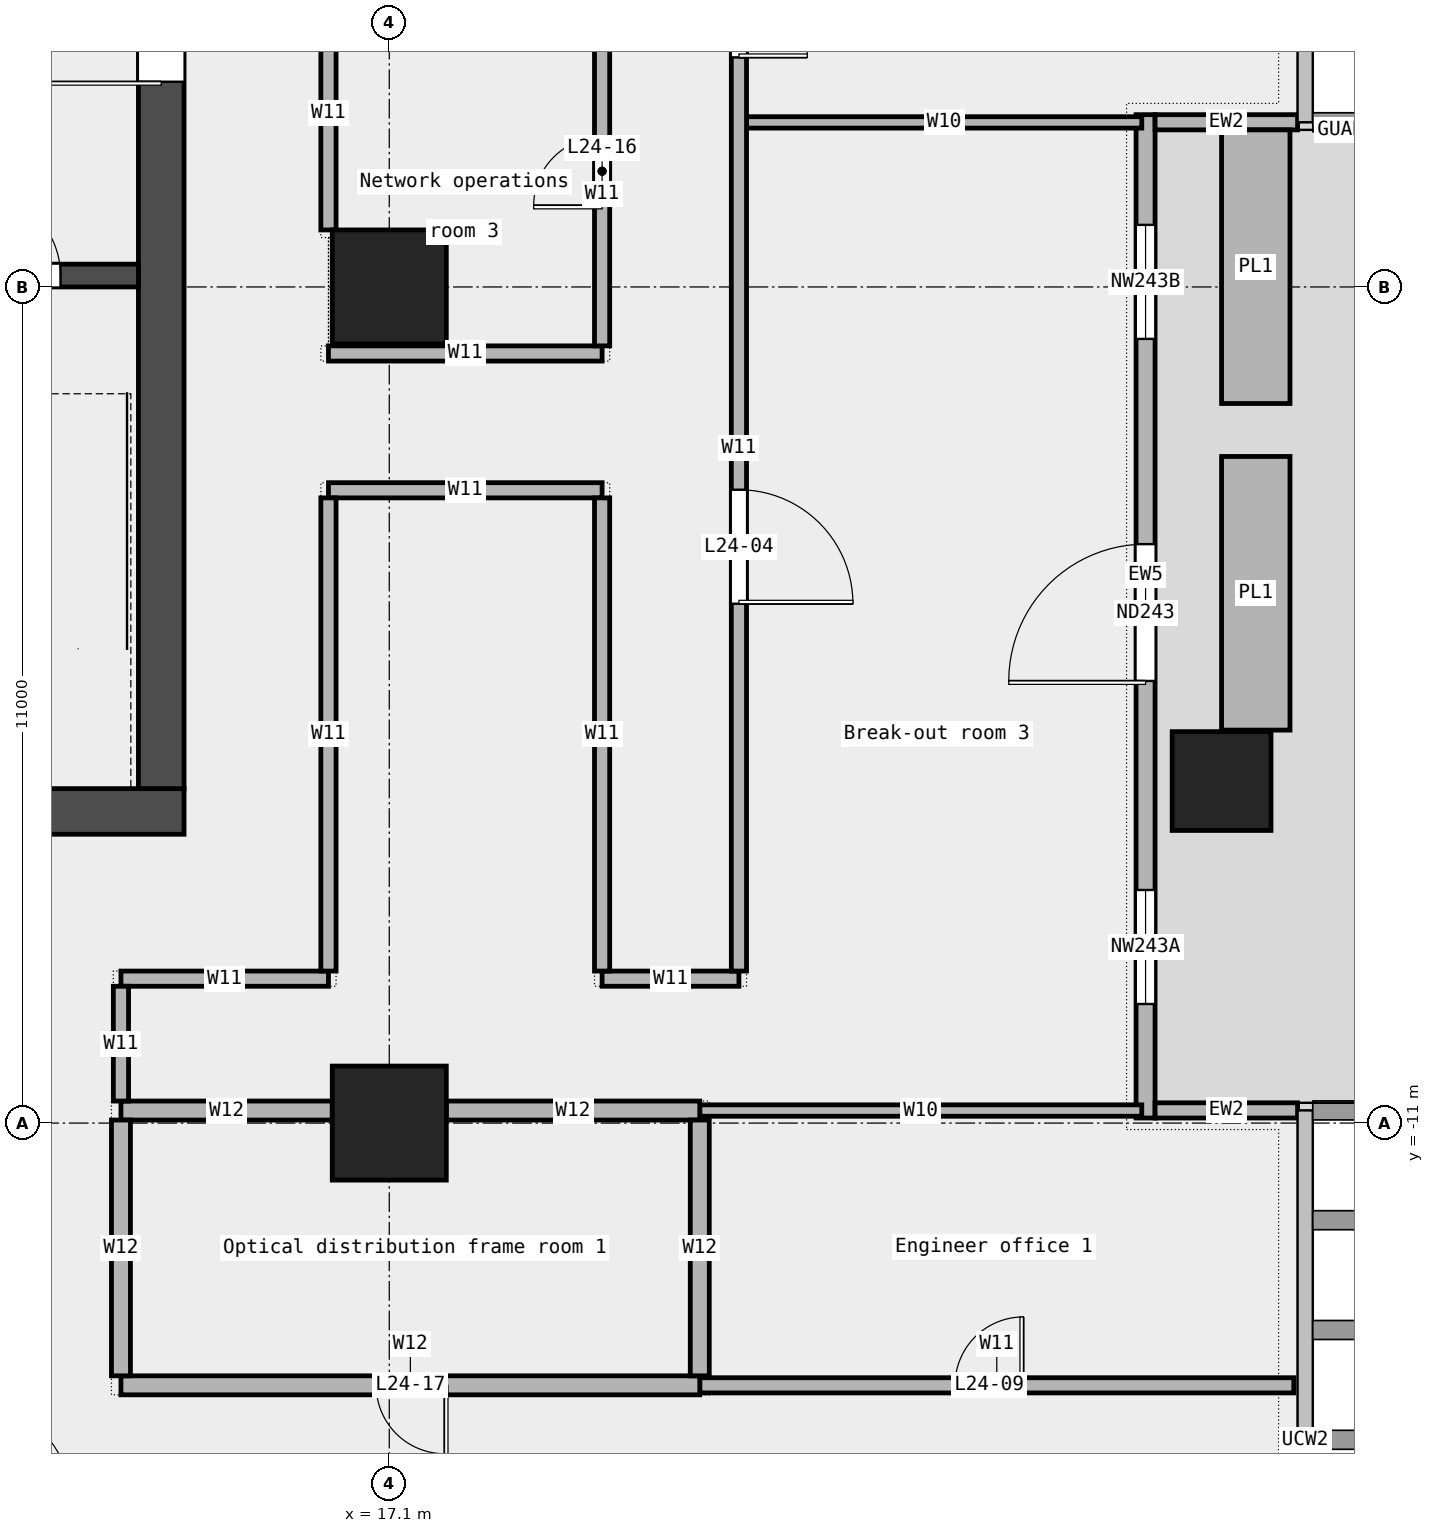
"""IFC4 building model, lengths in metres.
Left out: names, types, materials, properties, quantities, classifications, styles, units other than length and angle.
Written with IfcOpenShell. Run it as: python <this file> out.ifc"""

import sys

from ifc_helpers import new_model, si_unit, direction, frame, frame_2d, origin, origin_2d, place, context, subcontext, project, spatial, rectangle, extrude, element, fill, save


model = new_model("IFC4")
c1 = context("Model", 3, precision=1e-05, world=origin(), true_north=direction((0.0, 1.0)))
c2 = subcontext(c1, "Body", "Model", "MODEL_VIEW")
j1 = project(units=[si_unit("LENGTHUNIT", "METRE"), si_unit("PLANEANGLEUNIT", "RADIAN")], contexts=[c1])
p1 = place(None, origin())
s1 = spatial("IfcSite", under=j1, at=p1, CompositionType="ELEMENT")
p2 = place(p1, origin())
s2 = spatial("IfcBuilding", under=s1, at=p2, CompositionType="ELEMENT")
p3 = place(p2, frame((0.0, 0.0, 121.6)))
s3 = spatial("IfcBuildingStorey", under=s2, at=p3, CompositionType="ELEMENT", Elevation=121.6)
p4 = place(p3, frame((28.05, -6.5, 0.0), z_axis=(0.0, 0.0, 1.0), x_axis=(1.0, 0.0, 0.0)))
e1 = element("IfcColumn", 1, at=p4, inside=s3, PredefinedType="COLUMN", context=c2, shape_type="SweptSolid", body=[
    extrude(rectangle(XDim=1.3, YDim=1.3, at=origin_2d()), origin(), (0.0, 0.0, 1.0), 4.05),
])
for number, where, z_axis, x_axis in (
    (2, (17.1, -11.0, 0.0), (0.0, 0.0, 1.0), (1.0, 0.0, 0.0)),
    (3, (17.1, 0.0, 0.0), (0.0, 0.0, 1.0), (1.0, 0.0, 0.0)),
):
    element("IfcColumn", number, at=place(p3, frame(where, z_axis=z_axis, x_axis=x_axis)), inside=s3, PredefinedType="COLUMN", context=c2, shape_type="SweptSolid", body=[
        extrude(rectangle(XDim=1.5, YDim=1.5, at=origin_2d()), origin(), (0.0, 0.0, 1.0), 4.05),
    ])
p5 = place(p3, frame((27.05, -10.933, 0.0), z_axis=(0.0, 0.0, 1.0), x_axis=(0.0, 1.0, 0.0)))
e4 = element("IfcWall", 4, at=p5, inside=s3, PredefinedType="STANDARD", context=c2, shape_type="SweptSolid", body=[
    extrude(rectangle(XDim=13.2, YDim=0.25, at=frame_2d((6.6, 0.0))), origin(), (0.0, 0.0, 1.0), 4.05),
])
p6 = place(p5, frame((1.5, 0.0, 0.45)))
e5 = element("IfcOpeningElement", 5, at=p6, cuts=e4, PredefinedType="OPENING", context=c2, shape_type="SweptSolid", body=[
    extrude(rectangle(XDim=1.5, YDim=3.0, at=frame_2d((0.75, 1.5))), frame((0.0, 0.137, 0.0), z_axis=(0.0, -1.0, 0.0), x_axis=(1.0, 0.0, 0.0)), (0.0, 0.0, 1.0), 0.274),
])
p7 = place(p5, frame((5.75, 0.0, 0.0)))
e6 = element("IfcOpeningElement", 6, at=p7, cuts=e4, PredefinedType="OPENING", context=c2, shape_type="SweptSolid", body=[
    extrude(rectangle(XDim=1.8, YDim=2.4, at=frame_2d((0.9, 1.2))), frame((0.0, 0.137, 0.0), z_axis=(0.0, -1.0, 0.0), x_axis=(1.0, 0.0, 0.0)), (0.0, 0.0, 1.0), 0.274),
])
p8 = place(p5, frame((10.25, 0.0, 0.45)))
e7 = element("IfcOpeningElement", 7, at=p8, cuts=e4, PredefinedType="OPENING", context=c2, shape_type="SweptSolid", body=[
    extrude(rectangle(XDim=1.5, YDim=3.0, at=frame_2d((0.75, 1.5))), frame((0.0, 0.137, 0.0), z_axis=(0.0, -1.0, 0.0), x_axis=(1.0, 0.0, 0.0)), (0.0, 0.0, 1.0), 0.274),
])
for number, where, z_axis, x_axis in (
    (8, (29.05, -10.833, 0.0), (0.0, 0.0, 1.0), (-1.0, 0.0, 0.0)),
    (9, (29.05, 2.167, 0.0), (0.0, 0.0, 1.0), (-1.0, 0.0, 0.0)),
):
    element("IfcWall", number, at=place(p3, frame(where, z_axis=z_axis, x_axis=x_axis)), inside=s3, PredefinedType="STANDARD", context=c2, shape_type="SweptSolid", body=[
        extrude(rectangle(XDim=1.875, YDim=0.2, at=frame_2d((0.938, 0.0))), origin(), (0.0, 0.0, 1.0), 4.05),
    ])
for number, where, z_axis, x_axis in (
    (10, (28.5, -5.83, 0.0), (0.0, 0.0, 1.0), (0.0, 1.0, 0.0)),
    (11, (28.5, -1.533, 0.0), (0.0, 0.0, 1.0), (0.0, 1.0, 0.0)),
):
    element("IfcWall", number, at=place(p3, frame(where, z_axis=z_axis, x_axis=x_axis)), inside=s3, PredefinedType="STANDARD", context=c2, shape_type="SweptSolid", body=[
        extrude(rectangle(XDim=3.6, YDim=0.9, at=frame_2d((1.8, 0.0))), origin(), (0.0, 0.0, 1.0), 0.7),
    ])
p9 = place(p3, frame((21.185, -14.45, 0.0), z_axis=(0.0, 0.0, 1.0), x_axis=(1.0, 0.0, 0.0)))
e12 = element("IfcWall", 12, at=p9, inside=s3, PredefinedType="PARTITIONING", context=c2, shape_type="SweptSolid", body=[
    extrude(rectangle(XDim=7.815, YDim=0.2, at=frame_2d((3.907, 0.0))), origin(), (0.0, 0.0, 1.0), 4.05),
])
p10 = place(p9, frame((3.357, 0.0, 0.0)))
e13 = element("IfcOpeningElement", 13, at=p10, cuts=e12, PredefinedType="OPENING", context=c2, shape_type="SweptSolid", body=[
    extrude(rectangle(XDim=0.9, YDim=2.1, at=frame_2d((0.45, 1.05))), frame((0.0, 0.112, 0.0), z_axis=(0.0, -1.0, 0.0), x_axis=(1.0, 0.0, 0.0)), (0.0, 0.0, 1.0), 0.224),
])
p11 = place(p3, frame((13.57, -14.45, 0.0), z_axis=(0.0, 0.0, 1.0), x_axis=(1.0, 0.0, 0.0)))
e14 = element("IfcWall", 14, at=p11, inside=s3, PredefinedType="PARTITIONING", context=c2, shape_type="SweptSolid", body=[
    extrude(rectangle(XDim=7.615, YDim=0.25, at=frame_2d((3.808, 0.0))), origin(), (0.0, 0.0, 1.0), 4.05),
])
p12 = place(p11, frame((3.357, 0.0, 0.0)))
e15 = element("IfcOpeningElement", 15, at=p12, cuts=e14, PredefinedType="OPENING", context=c2, shape_type="SweptSolid", body=[
    extrude(rectangle(XDim=0.9, YDim=2.1, at=frame_2d((0.45, 1.05))), frame((0.0, 0.137, 0.0), z_axis=(0.0, -1.0, 0.0), x_axis=(1.0, 0.0, 0.0)), (0.0, 0.0, 1.0), 0.274),
])
p13 = place(p3, frame((21.185, -10.835, 0.0), z_axis=(0.0, 0.0, 1.0), x_axis=(1.0, 0.0, 0.0)))
e16 = element("IfcWall", 16, at=p13, inside=s3, PredefinedType="PARTITIONING", context=c2, shape_type="SweptSolid", body=[
    extrude(rectangle(XDim=5.815, YDim=0.15, at=frame_2d((2.907, 0.0))), origin(), (0.0, 0.0, 1.0), 4.05),
])
p14 = place(p3, frame((13.57, -10.835, 0.0), z_axis=(0.0, 0.0, 1.0), x_axis=(1.0, 0.0, 0.0)))
e17 = element("IfcWall", 17, at=p14, inside=s3, PredefinedType="PARTITIONING", context=c2, shape_type="SweptSolid", body=[
    extrude(rectangle(XDim=2.78, YDim=0.25, at=frame_2d((1.39, 0.0))), origin(), (0.0, 0.0, 1.0), 4.05),
])
p15 = place(p3, frame((17.85, -10.835, 0.0), z_axis=(0.0, 0.0, 1.0), x_axis=(1.0, 0.0, 0.0)))
e18 = element("IfcWall", 18, at=p15, inside=s3, PredefinedType="PARTITIONING", context=c2, shape_type="SweptSolid", body=[
    extrude(rectangle(XDim=3.335, YDim=0.25, at=frame_2d((1.667, 0.0))), origin(), (0.0, 0.0, 1.0), 4.05),
])
p16 = place(p3, frame((13.57, -9.1, 0.0), z_axis=(0.0, 0.0, 1.0), x_axis=(1.0, 0.0, 0.0)))
e19 = element("IfcWall", 19, at=p16, inside=s3, PredefinedType="PARTITIONING", context=c2, shape_type="SweptSolid", body=[
    extrude(rectangle(XDim=2.73, YDim=0.2, at=frame_2d((1.365, 0.0))), origin(), (0.0, 0.0, 1.0), 4.05),
])
p17 = place(p3, frame((19.9, -9.1, 0.0), z_axis=(0.0, 0.0, 1.0), x_axis=(1.0, 0.0, 0.0)))
e20 = element("IfcWall", 20, at=p17, inside=s3, PredefinedType="PARTITIONING", context=c2, shape_type="SweptSolid", body=[
    extrude(rectangle(XDim=1.8, YDim=0.2, at=frame_2d((0.9, 0.0))), origin(), (0.0, 0.0, 1.0), 4.05),
])
for number, where, z_axis, x_axis in (
    (21, (16.3, -2.675, 0.0), (0.0, 0.0, 1.0), (1.0, 0.0, 0.0)),
    (22, (16.3, -0.875, 0.0), (0.0, 0.0, 1.0), (1.0, 0.0, 0.0)),
):
    element("IfcWall", number, at=place(p3, frame(where, z_axis=z_axis, x_axis=x_axis)), inside=s3, PredefinedType="PARTITIONING", context=c2, shape_type="SweptSolid", body=[
        extrude(rectangle(XDim=3.6, YDim=0.2, at=frame_2d((1.8, 0.0))), origin(), (0.0, 0.0, 1.0), 4.05),
    ])
p18 = place(p3, frame((21.8, 2.165, 0.0), z_axis=(0.0, 0.0, 1.0), x_axis=(1.0, 0.0, 0.0)))
e23 = element("IfcWall", 23, at=p18, inside=s3, PredefinedType="PARTITIONING", context=c2, shape_type="SweptSolid", body=[
    extrude(rectangle(XDim=5.2, YDim=0.15, at=frame_2d((2.6, 0.0))), origin(), (0.0, 0.0, 1.0), 4.05),
])
p19 = place(p3, frame((13.57, -10.71, 0.0), z_axis=(0.0, 0.0, 1.0), x_axis=(0.0, 1.0, 0.0)))
e24 = element("IfcWall", 24, at=p19, inside=s3, PredefinedType="PARTITIONING", context=c2, shape_type="SweptSolid", body=[
    extrude(rectangle(XDim=1.51, YDim=0.2, at=frame_2d((0.755, 0.0))), origin(), (0.0, 0.0, 1.0), 4.05),
])
p20 = place(p3, frame((13.57, -14.325, 0.0), z_axis=(0.0, 0.0, 1.0), x_axis=(0.0, 1.0, 0.0)))
e25 = element("IfcWall", 25, at=p20, inside=s3, PredefinedType="PARTITIONING", context=c2, shape_type="SweptSolid", body=[
    extrude(rectangle(XDim=3.365, YDim=0.25, at=frame_2d((1.683, 0.0))), origin(), (0.0, 0.0, 1.0), 4.05),
])
p21 = place(p3, frame((16.3, -9.0, 0.0), z_axis=(0.0, 0.0, 1.0), x_axis=(0.0, 1.0, 0.0)))
e26 = element("IfcWall", 26, at=p21, inside=s3, PredefinedType="PARTITIONING", context=c2, shape_type="SweptSolid", body=[
    extrude(rectangle(XDim=6.225, YDim=0.2, at=frame_2d((3.113, 0.0))), origin(), (0.0, 0.0, 1.0), 4.05),
])
p22 = place(p3, frame((16.3, 0.75, 0.0), z_axis=(0.0, 0.0, 1.0), x_axis=(0.0, 1.0, 0.0)))
e27 = element("IfcWall", 27, at=p22, inside=s3, PredefinedType="PARTITIONING", context=c2, shape_type="SweptSolid", body=[
    extrude(rectangle(XDim=3.07, YDim=0.2, at=frame_2d((1.535, 0.0))), origin(), (0.0, 0.0, 1.0), 4.05),
])
p23 = place(p3, frame((19.9, -9.0, 0.0), z_axis=(0.0, 0.0, 1.0), x_axis=(0.0, 1.0, 0.0)))
e28 = element("IfcWall", 28, at=p23, inside=s3, PredefinedType="PARTITIONING", context=c2, shape_type="SweptSolid", body=[
    extrude(rectangle(XDim=6.225, YDim=0.2, at=frame_2d((3.113, 0.0))), origin(), (0.0, 0.0, 1.0), 4.05),
])
p24 = place(p3, frame((19.9, -0.775, 0.0), z_axis=(0.0, 0.0, 1.0), x_axis=(0.0, 1.0, 0.0)))
e29 = element("IfcWall", 29, at=p24, inside=s3, PredefinedType="PARTITIONING", context=c2, shape_type="SweptSolid", body=[
    extrude(rectangle(XDim=4.595, YDim=0.2, at=frame_2d((2.297, 0.0))), origin(), (0.0, 0.0, 1.0), 4.05),
])
p25 = place(p24, frame((1.847, 0.0, 0.0)))
e30 = element("IfcOpeningElement", 30, at=p25, cuts=e29, PredefinedType="OPENING", context=c2, shape_type="SweptSolid", body=[
    extrude(rectangle(XDim=0.9, YDim=2.1, at=frame_2d((0.45, 1.05))), frame((0.0, 0.112, 0.0), z_axis=(0.0, -1.0, 0.0), x_axis=(1.0, 0.0, 0.0)), (0.0, 0.0, 1.0), 0.224),
])
p26 = place(p3, frame((21.185, -14.325, 0.0), z_axis=(0.0, 0.0, 1.0), x_axis=(0.0, 1.0, 0.0)))
e31 = element("IfcWall", 31, at=p26, inside=s3, PredefinedType="PARTITIONING", context=c2, shape_type="SweptSolid", body=[
    extrude(rectangle(XDim=3.365, YDim=0.25, at=frame_2d((1.683, 0.0))), origin(), (0.0, 0.0, 1.0), 4.05),
])
p27 = place(p3, frame((21.7, -9.0, 0.0), z_axis=(0.0, 0.0, 1.0), x_axis=(0.0, 1.0, 0.0)))
e32 = element("IfcWall", 32, at=p27, inside=s3, PredefinedType="PARTITIONING", context=c2, shape_type="SweptSolid", body=[
    extrude(rectangle(XDim=13.775, YDim=0.2, at=frame_2d((6.887, 0.0))), origin(), (0.0, 0.0, 1.0), 4.05),
])
p28 = place(p27, frame((4.833, 0.0, 0.0)))
e33 = element("IfcOpeningElement", 33, at=p28, cuts=e32, PredefinedType="OPENING", context=c2, shape_type="SweptSolid", body=[
    extrude(rectangle(XDim=1.5, YDim=2.1, at=frame_2d((0.75, 1.05))), frame((0.0, 0.112, 0.0), z_axis=(0.0, -1.0, 0.0), x_axis=(1.0, 0.0, 0.0)), (0.0, 0.0, 1.0), 0.224),
])
p29 = place(p27, frame((12.02, 0.0, 0.0)))
e34 = element("IfcOpeningElement", 34, at=p29, cuts=e32, PredefinedType="OPENING", context=c2, shape_type="SweptSolid", body=[
    extrude(rectangle(XDim=0.9, YDim=2.1, at=frame_2d((0.45, 1.05))), frame((0.0, 0.112, 0.0), z_axis=(0.0, -1.0, 0.0), x_axis=(1.0, 0.0, 0.0)), (0.0, 0.0, 1.0), 0.224),
])
p30 = place(p3, frame((-14.4, -6.9, 0.0), z_axis=(0.0, 0.0, 1.0), x_axis=(1.0, 0.0, 0.0)))
e35 = element("IfcWall", 35, at=p30, inside=s3, PredefinedType="SHEAR", context=c2, shape_type="SweptSolid", body=[
    extrude(rectangle(XDim=28.8, YDim=0.6, at=frame_2d((14.4, 0.0))), origin(), (0.0, 0.0, 1.0), 4.2),
])
p31 = place(p30, frame((4.9, 0.0, 0.0)))
e36 = element("IfcOpeningElement", 36, at=p31, cuts=e35, PredefinedType="OPENING", context=c2, shape_type="SweptSolid", body=[
    extrude(rectangle(XDim=1.0, YDim=2.1, at=frame_2d((0.5, 1.05))), frame((0.0, 0.312, 0.0), z_axis=(0.0, -1.0, 0.0), x_axis=(1.0, 0.0, 0.0)), (0.0, 0.0, 1.0), 0.624),
])
p32 = place(p30, frame((9.675, 0.0, 0.0)))
e37 = element("IfcOpeningElement", 37, at=p32, cuts=e35, PredefinedType="OPENING", context=c2, shape_type="SweptSolid", body=[
    extrude(rectangle(XDim=1.2, YDim=2.1, at=frame_2d((0.6, 1.05))), frame((0.0, 0.312, 0.0), z_axis=(0.0, -1.0, 0.0), x_axis=(1.0, 0.0, 0.0)), (0.0, 0.0, 1.0), 0.624),
])
p33 = place(p30, frame((14.837, 0.0, 0.0)))
e38 = element("IfcOpeningElement", 38, at=p33, cuts=e35, PredefinedType="OPENING", context=c2, shape_type="SweptSolid", body=[
    extrude(rectangle(XDim=1.0, YDim=2.1, at=frame_2d((0.5, 1.05))), frame((0.0, 0.312, 0.0), z_axis=(0.0, -1.0, 0.0), x_axis=(1.0, 0.0, 0.0)), (0.0, 0.0, 1.0), 0.624),
])
p34 = place(p30, frame((18.75, 0.0, 0.0)))
e39 = element("IfcOpeningElement", 39, at=p34, cuts=e35, PredefinedType="OPENING", context=c2, shape_type="SweptSolid", body=[
    extrude(rectangle(XDim=1.8, YDim=2.1, at=frame_2d((0.9, 1.05))), frame((0.0, 0.312, 0.0), z_axis=(0.0, -1.0, 0.0), x_axis=(1.0, 0.0, 0.0)), (0.0, 0.0, 1.0), 0.624),
])
p35 = place(p30, frame((23.087, 0.0, 0.0)))
e40 = element("IfcOpeningElement", 40, at=p35, cuts=e35, PredefinedType="OPENING", context=c2, shape_type="SweptSolid", body=[
    extrude(rectangle(XDim=1.0, YDim=2.1, at=frame_2d((0.5, 1.05))), frame((0.0, 0.312, 0.0), z_axis=(0.0, -1.0, 0.0), x_axis=(1.0, 0.0, 0.0)), (0.0, 0.0, 1.0), 0.624),
])
p36 = place(p3, frame((14.1, -6.6, 0.0), z_axis=(0.0, 0.0, 1.0), x_axis=(0.0, 1.0, 0.0)))
e41 = element("IfcWall", 41, at=p36, inside=s3, PredefinedType="SHEAR", context=c2, shape_type="SweptSolid", body=[
    extrude(rectangle(XDim=19.5, YDim=0.6, at=frame_2d((9.75, 0.0))), origin(), (0.0, 0.0, 1.0), 4.2),
])
p37 = place(p36, frame((9.3, 0.0, 0.0)))
e42 = element("IfcOpeningElement", 42, at=p37, cuts=e41, PredefinedType="OPENING", context=c2, shape_type="SweptSolid", body=[
    extrude(rectangle(XDim=1.8, YDim=2.1, at=frame_2d((0.9, 1.05))), frame((0.0, 0.312, 0.0), z_axis=(0.0, -1.0, 0.0), x_axis=(1.0, 0.0, 0.0)), (0.0, 0.0, 1.0), 0.624),
])
p38 = place(p3, frame((10.65, 0.15, 0.0), z_axis=(0.0, 0.0, 1.0), x_axis=(1.0, 0.0, 0.0)))
e43 = element("IfcWall", 43, at=p38, inside=s3, PredefinedType="SOLIDWALL", context=c2, shape_type="SweptSolid", body=[
    extrude(rectangle(XDim=3.15, YDim=0.3, at=frame_2d((1.575, 0.0))), origin(), (0.0, 0.0, 1.0), 4.2),
])
p39 = place(p38, frame((1.025, 0.0, 0.0)))
e44 = element("IfcOpeningElement", 44, at=p39, cuts=e43, PredefinedType="OPENING", context=c2, shape_type="SweptSolid", body=[
    extrude(rectangle(XDim=1.1, YDim=2.1, at=frame_2d((0.55, 1.05))), frame((0.0, 0.162, 0.0), z_axis=(0.0, -1.0, 0.0), x_axis=(1.0, 0.0, 0.0)), (0.0, 0.0, 1.0), 0.324),
])
p40 = place(p6, origin())
e45 = element("IfcWindow", 45, at=p40, inside=s3, PartitioningType="SINGLE_PANEL", PredefinedType="WINDOW", context=c2, shape_type="SweptSolid", body=[
    extrude(rectangle(XDim=1.5, YDim=3.0, at=frame_2d((0.75, 1.5))), frame((0.0, 0.03, 0.0), z_axis=(0.0, -1.0, 0.0), x_axis=(1.0, 0.0, 0.0)), (0.0, 0.0, 1.0), 0.06),
])
fill(e5, e45)
p41 = place(p7, origin())
e46 = element("IfcDoor", 46, at=p41, inside=s3, OperationType="DOUBLE_DOOR_SINGLE_SWING", PredefinedType="DOOR", context=c2, shape_type="SweptSolid", body=[
    extrude(rectangle(XDim=1.8, YDim=2.4, at=frame_2d((0.9, 1.2))), frame((0.0, 0.025, 0.0), z_axis=(0.0, -1.0, 0.0), x_axis=(1.0, 0.0, 0.0)), (0.0, 0.0, 1.0), 0.05),
])
fill(e6, e46)
p42 = place(p8, origin())
e47 = element("IfcWindow", 47, at=p42, inside=s3, PartitioningType="SINGLE_PANEL", PredefinedType="WINDOW", context=c2, shape_type="SweptSolid", body=[
    extrude(rectangle(XDim=1.5, YDim=3.0, at=frame_2d((0.75, 1.5))), frame((0.0, 0.03, 0.0), z_axis=(0.0, -1.0, 0.0), x_axis=(1.0, 0.0, 0.0)), (0.0, 0.0, 1.0), 0.06),
])
fill(e7, e47)
p43 = place(p28, origin())
e48 = element("IfcDoor", 48, at=p43, inside=s3, OperationType="DOUBLE_DOOR_SINGLE_SWING", PredefinedType="DOOR", context=c2, shape_type="SweptSolid", body=[
    extrude(rectangle(XDim=1.5, YDim=2.1, at=frame_2d((0.75, 1.05))), frame((0.0, 0.025, 0.0), z_axis=(0.0, -1.0, 0.0), x_axis=(1.0, 0.0, 0.0)), (0.0, 0.0, 1.0), 0.05),
])
fill(e33, e48)
p44 = place(p10, origin())
e49 = element("IfcDoor", 49, at=p44, inside=s3, OperationType="SINGLE_SWING_RIGHT", PredefinedType="DOOR", context=c2, shape_type="SweptSolid", body=[
    extrude(rectangle(XDim=0.9, YDim=2.1, at=frame_2d((0.45, 1.05))), frame((0.0, 0.025, 0.0), z_axis=(0.0, -1.0, 0.0), x_axis=(1.0, 0.0, 0.0)), (0.0, 0.0, 1.0), 0.05),
])
fill(e13, e49)
p45 = place(p25, origin())
e50 = element("IfcDoor", 50, at=p45, inside=s3, OperationType="SINGLE_SWING_LEFT", PredefinedType="DOOR", context=c2, shape_type="SweptSolid", body=[
    extrude(rectangle(XDim=0.9, YDim=2.1, at=frame_2d((0.45, 1.05))), frame((0.0, 0.025, 0.0), z_axis=(0.0, -1.0, 0.0), x_axis=(1.0, 0.0, 0.0)), (0.0, 0.0, 1.0), 0.05),
])
fill(e30, e50)
p46 = place(p12, origin())
e51 = element("IfcDoor", 51, at=p46, inside=s3, OperationType="SINGLE_SWING_LEFT", PredefinedType="DOOR", context=c2, shape_type="SweptSolid", body=[
    extrude(rectangle(XDim=0.9, YDim=2.1, at=frame_2d((0.45, 1.05))), frame((0.0, 0.025, 0.0), z_axis=(0.0, -1.0, 0.0), x_axis=(1.0, 0.0, 0.0)), (0.0, 0.0, 1.0), 0.05),
])
fill(e15, e51)
p47 = place(p29, origin())
e52 = element("IfcDoor", 52, at=p47, inside=s3, OperationType="SINGLE_SWING_RIGHT", PredefinedType="DOOR", context=c2, shape_type="SweptSolid", body=[
    extrude(rectangle(XDim=0.9, YDim=2.1, at=frame_2d((0.45, 1.05))), frame((0.0, 0.025, 0.0), z_axis=(0.0, -1.0, 0.0), x_axis=(1.0, 0.0, 0.0)), (0.0, 0.0, 1.0), 0.05),
])
fill(e34, e52)
p48 = place(p39, origin())
e53 = element("IfcDoor", 53, at=p48, inside=s3, OperationType="SINGLE_SWING_RIGHT", PredefinedType="DOOR", context=c2, shape_type="SweptSolid", body=[
    extrude(rectangle(XDim=1.1, YDim=2.1, at=frame_2d((0.55, 1.05))), frame((0.0, 0.025, 0.0), z_axis=(0.0, -1.0, 0.0), x_axis=(1.0, 0.0, 0.0)), (0.0, 0.0, 1.0), 0.05),
])
fill(e44, e53)
p49 = place(p37, origin())
e54 = element("IfcDoor", 54, at=p49, inside=s3, OperationType="DOUBLE_DOOR_SINGLE_SWING", PredefinedType="DOOR", context=c2, shape_type="SweptSolid", body=[
    extrude(rectangle(XDim=1.8, YDim=2.1, at=frame_2d((0.9, 1.05))), frame((0.0, 0.025, 0.0), z_axis=(0.0, -1.0, 0.0), x_axis=(1.0, 0.0, 0.0)), (0.0, 0.0, 1.0), 0.05),
])
fill(e42, e54)
save(model, sys.argv[1])
